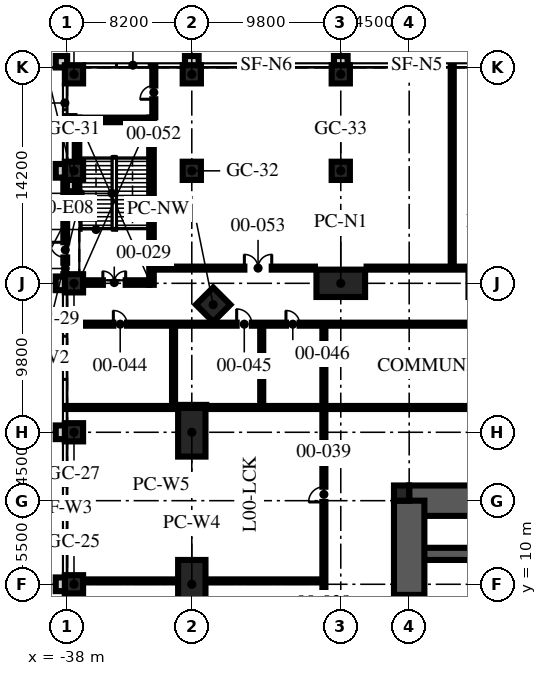
"""IFC4 building model, lengths in metres.
Left out: names, types, materials, properties, quantities, classifications, styles, units other than length and angle.
Written with IfcOpenShell. Run it as: python <this file> out.ifc"""

import sys

from ifc_helpers import new_model, si_unit, direction, frame, frame_2d, origin, origin_2d, place, context, subcontext, project, spatial, rectangle, hollow_rectangle, extrude, element, fill, save


model = new_model("IFC4")
c1 = context("Model", 3, precision=1e-05, world=origin(), true_north=direction((0.0, 1.0)))
c2 = subcontext(c1, "Body", "Model", "MODEL_VIEW")
j1 = project(units=[si_unit("LENGTHUNIT", "METRE"), si_unit("PLANEANGLEUNIT", "RADIAN")], contexts=[c1])
p1 = place(None, origin())
s1 = spatial("IfcSite", under=j1, at=p1, CompositionType="ELEMENT")
p2 = place(p1, origin())
s2 = spatial("IfcBuilding", under=s1, at=p2, CompositionType="ELEMENT")
p3 = place(p2, origin())
s3 = spatial("IfcBuildingStorey", under=s2, at=p3, CompositionType="ELEMENT", Elevation=0.0)
p4 = place(p3, frame((-15.5, 15.5, -0.3), z_axis=(0.0, 0.0, 1.0), x_axis=(1.0, 0.0, 0.0)))
e1 = element("IfcWall", 1, at=p4, inside=s3, PredefinedType="SHEAR", context=c2, shape_type="SweptSolid", body=[
    extrude(rectangle(XDim=31.0, YDim=2.0, at=frame_2d((15.5, 0.0))), origin(), (0.0, 0.0, 1.0), 6.0),
])
p5 = place(p4, frame((10.4, 0.0, 0.3)))
e2 = element("IfcOpeningElement", 2, at=p5, cuts=e1, PredefinedType="OPENING", context=c2, shape_type="SweptSolid", body=[
    extrude(rectangle(XDim=1.1, YDim=2.1, at=frame_2d((0.55, 1.05))), frame((0.0, 1.01, 0.0), z_axis=(0.0, -1.0, 0.0), x_axis=(1.0, 0.0, 0.0)), (0.0, 0.0, 1.0), 2.02),
])
p6 = place(p4, frame((13.5, 0.0, 0.3)))
e3 = element("IfcOpeningElement", 3, at=p6, cuts=e1, PredefinedType="OPENING", context=c2, shape_type="SweptSolid", body=[
    extrude(rectangle(XDim=1.1, YDim=2.1, at=frame_2d((0.55, 1.05))), frame((0.0, 1.01, 0.0), z_axis=(0.0, -1.0, 0.0), x_axis=(1.0, 0.0, 0.0)), (0.0, 0.0, 1.0), 2.02),
])
p7 = place(p4, frame((16.6, 0.0, 0.3)))
e4 = element("IfcOpeningElement", 4, at=p7, cuts=e1, PredefinedType="OPENING", context=c2, shape_type="SweptSolid", body=[
    extrude(rectangle(XDim=1.1, YDim=2.1, at=frame_2d((0.55, 1.05))), frame((0.0, 1.01, 0.0), z_axis=(0.0, -1.0, 0.0), x_axis=(1.0, 0.0, 0.0)), (0.0, 0.0, 1.0), 2.02),
])
p8 = place(p3, frame((-15.5, 12.0, -0.3), z_axis=(0.0, 0.0, 1.0), x_axis=(1.0, 0.0, 0.0)))
e5 = element("IfcWall", 5, at=p8, inside=s3, PredefinedType="SHEAR", context=c2, shape_type="SweptSolid", body=[
    extrude(rectangle(XDim=31.0, YDim=0.8, at=frame_2d((15.5, 0.0))), origin(), (0.0, 0.0, 1.0), 6.0),
])
p9 = place(p3, frame((-15.5, -15.5, -0.3), z_axis=(0.0, 0.0, 1.0), x_axis=(0.0, 1.0, 0.0)))
e6 = element("IfcWall", 6, at=p9, inside=s3, PredefinedType="SHEAR", context=c2, shape_type="SweptSolid", body=[
    extrude(rectangle(XDim=31.0, YDim=2.0, at=frame_2d((15.5, 0.0))), origin(), (0.0, 0.0, 1.0), 6.0),
])
p10 = place(p9, frame((6.5, 0.0, 0.3)))
e7 = element("IfcOpeningElement", 7, at=p10, cuts=e6, PredefinedType="OPENING", context=c2, shape_type="SweptSolid", body=[
    extrude(rectangle(XDim=1.2, YDim=2.1, at=frame_2d((0.6, 1.05))), frame((0.0, 1.01, 0.0), z_axis=(0.0, -1.0, 0.0), x_axis=(1.0, 0.0, 0.0)), (0.0, 0.0, 1.0), 2.02),
])
p11 = place(p9, frame((23.0, 0.0, 0.3)))
e8 = element("IfcOpeningElement", 8, at=p11, cuts=e6, PredefinedType="OPENING", context=c2, shape_type="SweptSolid", body=[
    extrude(rectangle(XDim=1.8, YDim=2.1, at=frame_2d((0.9, 1.05))), frame((0.0, 1.01, 0.0), z_axis=(0.0, -1.0, 0.0), x_axis=(1.0, 0.0, 0.0)), (0.0, 0.0, 1.0), 2.02),
])
p12 = place(p3, frame((-16.0, 16.0, -0.3), z_axis=(0.0, 0.0, 1.0), x_axis=(1.0, 0.0, 0.0)))
e9 = element("IfcColumn", 9, at=p12, inside=s3, PredefinedType="COLUMN", context=c2, shape_type="SweptSolid", body=[
    extrude(rectangle(XDim=1.0, YDim=1.0, at=origin_2d()), origin(), (0.0, 0.0, 1.0), 6.0),
])
for number, where, z_axis, x_axis in (
    (10, (-20.0, 29.8, 0.0), (0.0, 0.0, 1.0), (1.0, 0.0, 0.0)),
    (11, (-29.8, 10.0, 0.0), (0.0, 0.0, 1.0), (0.0, 1.0, 0.0)),
    (12, (-29.8, 20.0, 0.0), (0.0, 0.0, 1.0), (0.0, 1.0, 0.0)),
):
    element("IfcColumn", number, at=place(p3, frame(where, z_axis=z_axis, x_axis=x_axis)), inside=s3, PredefinedType="COLUMN", context=c2, shape_type="SweptSolid", body=[
        extrude(hollow_rectangle(XDim=3.2, YDim=1.8, WallThickness=0.2, at=origin_2d()), origin(), (0.0, 0.0, 1.0), 6.0),
    ])
p13 = place(p3, frame((-28.394, 28.394, 0.0), z_axis=(0.0, 0.0, 1.0), x_axis=(0.707106781187, 0.707106781187, 0.0)))
e13 = element("IfcColumn", 13, at=p13, inside=s3, PredefinedType="COLUMN", context=c2, shape_type="SweptSolid", body=[
    extrude(hollow_rectangle(XDim=1.6, YDim=1.6, WallThickness=0.1, at=origin_2d()), origin(), (0.0, 0.0, 1.0), 6.0),
])
for number, where, z_axis, x_axis in (
    (14, (-37.55, 10.0, 0.0), (0.0, 0.0, 1.0), (1.0, 0.0, 0.0)),
    (15, (-37.55, 20.0, 0.0), (0.0, 0.0, 1.0), (1.0, 0.0, 0.0)),
    (16, (-37.55, 29.8, 0.0), (0.0, 0.0, 1.0), (1.0, 0.0, 0.0)),
    (17, (-37.55, 37.2, 0.0), (0.0, 0.0, 1.0), (1.0, 0.0, 0.0)),
    (18, (-29.8, 37.2, 0.0), (0.0, 0.0, 1.0), (1.0, 0.0, 0.0)),
    (19, (-20.0, 37.2, 0.0), (0.0, 0.0, 1.0), (1.0, 0.0, 0.0)),
    (20, (-37.55, 43.55, 0.0), (0.0, 0.0, 1.0), (1.0, 0.0, 0.0)),
    (21, (-29.8, 43.55, 0.0), (0.0, 0.0, 1.0), (1.0, 0.0, 0.0)),
    (22, (-20.0, 43.55, 0.0), (0.0, 0.0, 1.0), (1.0, 0.0, 0.0)),
):
    element("IfcColumn", number, at=place(p3, frame(where, z_axis=z_axis, x_axis=x_axis)), inside=s3, PredefinedType="COLUMN", context=c2, shape_type="SweptSolid", body=[
        extrude(rectangle(XDim=1.2, YDim=1.2, at=origin_2d()), origin(), (0.0, 0.0, 1.0), 6.0),
    ])
for number, where, z_axis, x_axis in (
    (23, (-19.55, 44.375, -0.2), (0.0, 0.0, 1.0), (-1.0, 0.0, 0.0)),
    (24, (-29.35, 44.375, -0.2), (0.0, 0.0, 1.0), (-1.0, 0.0, 0.0)),
):
    element("IfcWall", number, at=place(p3, frame(where, z_axis=z_axis, x_axis=x_axis)), inside=s3, PredefinedType="SOLIDWALL", context=c2, shape_type="SweptSolid", body=[
        extrude(rectangle(XDim=0.9, YDim=0.75, at=frame_2d((0.45, 0.0))), origin(), (0.0, 0.0, 1.0), 6.2),
    ])
p14 = place(p3, frame((-38.0, 44.375, -0.2), z_axis=(0.0, 0.0, 1.0), x_axis=(-1.0, 0.0, 0.0)))
e25 = element("IfcWall", 25, at=p14, inside=s3, PredefinedType="SOLIDWALL", context=c2, shape_type="SweptSolid", body=[
    extrude(rectangle(XDim=0.75, YDim=0.75, at=frame_2d((0.375, 0.0))), origin(), (0.0, 0.0, 1.0), 6.2),
])
for number, where, z_axis, x_axis in (
    (26, (-38.375, 37.65, -0.2), (0.0, 0.0, 1.0), (0.0, -1.0, 0.0)),
    (27, (-38.375, 30.25, -0.2), (0.0, 0.0, 1.0), (0.0, -1.0, 0.0)),
    (28, (-38.375, 20.45, -0.2), (0.0, 0.0, 1.0), (0.0, -1.0, 0.0)),
    (29, (-38.375, 10.45, -0.2), (0.0, 0.0, 1.0), (0.0, -1.0, 0.0)),
):
    element("IfcWall", number, at=place(p3, frame(where, z_axis=z_axis, x_axis=x_axis)), inside=s3, PredefinedType="SOLIDWALL", context=c2, shape_type="SweptSolid", body=[
        extrude(rectangle(XDim=0.9, YDim=0.75, at=frame_2d((0.45, 0.0))), origin(), (0.0, 0.0, 1.0), 6.2),
    ])
p15 = place(p3, frame((-38.125, 36.75, -0.2), z_axis=(0.0, 0.0, 1.0), x_axis=(0.0, -1.0, 0.0)))
e30 = element("IfcWall", 30, at=p15, inside=s3, PredefinedType="SOLIDWALL", context=c2, shape_type="SweptSolid", body=[
    extrude(rectangle(XDim=6.5, YDim=0.25, at=frame_2d((3.25, 0.0))), origin(), (0.0, 0.0, 1.0), 5.6),
])
p16 = place(p15, frame((5.6, 0.0, 1.4)))
e31 = element("IfcOpeningElement", 31, at=p16, cuts=e30, PredefinedType="OPENING", context=c2, shape_type="SweptSolid", body=[
    extrude(rectangle(XDim=0.75, YDim=1.7, at=frame_2d((0.375, 0.85))), frame((0.0, 0.135, 0.0), z_axis=(0.0, -1.0, 0.0), x_axis=(1.0, 0.0, 0.0)), (0.0, 0.0, 1.0), 0.27),
])
p17 = place(p15, frame((5.25, 0.0, 0.2), z_axis=(0.0, 0.0, 1.0), x_axis=(-1.0, 0.0, 0.0)))
e32 = element("IfcOpeningElement", 32, at=p17, cuts=e30, PredefinedType="OPENING", context=c2, shape_type="SweptSolid", body=[
    extrude(rectangle(XDim=1.0, YDim=2.4, at=frame_2d((0.5, 1.2))), frame((0.0, 0.135, 0.0), z_axis=(0.0, -1.0, 0.0), x_axis=(1.0, 0.0, 0.0)), (0.0, 0.0, 1.0), 0.27),
])
p18 = place(p3, frame((-37.35, 35.556, 0.0), z_axis=(0.0, 0.0, 1.0), x_axis=(0.0, 1.0, 0.0)))
e33 = element("IfcWall", 33, at=p18, inside=s3, PredefinedType="SOLIDWALL", context=c2, shape_type="SweptSolid", body=[
    extrude(rectangle(XDim=5.144, YDim=0.3, at=frame_2d((2.572, 0.0))), origin(), (0.0, 0.0, 1.0), 5.7),
])
p19 = place(p3, frame((-38.0, 35.706, 0.0), z_axis=(0.0, 0.0, 1.0), x_axis=(1.0, 0.0, 0.0)))
e34 = element("IfcWall", 34, at=p19, inside=s3, PredefinedType="PARTITIONING", context=c2, shape_type="SweptSolid", body=[
    extrude(rectangle(XDim=0.5, YDim=0.3, at=frame_2d((0.25, 0.0))), origin(), (0.0, 0.0, 1.0), 4.27),
])
p20 = place(p3, frame((-38.0, 29.85, 0.0), z_axis=(0.0, 0.0, 1.0), x_axis=(1.0, 0.0, 0.0)))
e35 = element("IfcWall", 35, at=p20, inside=s3, PredefinedType="SOLIDWALL", context=c2, shape_type="SweptSolid", body=[
    extrude(rectangle(XDim=5.4, YDim=0.3, at=frame_2d((2.7, 0.0))), origin(), (0.0, 0.0, 1.0), 5.7),
])
p21 = place(p20, frame((2.35, 0.0, 0.0)))
e36 = element("IfcOpeningElement", 36, at=p21, cuts=e35, PredefinedType="OPENING", context=c2, shape_type="SweptSolid", body=[
    extrude(rectangle(XDim=1.5, YDim=2.1, at=frame_2d((0.75, 1.05))), frame((0.0, 0.16, 0.0), z_axis=(0.0, -1.0, 0.0), x_axis=(1.0, 0.0, 0.0)), (0.0, 0.0, 1.0), 0.32),
])
p22 = place(p3, frame((-32.45, 29.7, 0.0), z_axis=(0.0, 0.0, 1.0), x_axis=(0.0, 1.0, 0.0)))
e37 = element("IfcWall", 37, at=p22, inside=s3, PredefinedType="SOLIDWALL", context=c2, shape_type="SweptSolid", body=[
    extrude(rectangle(XDim=11.0, YDim=0.3, at=frame_2d((5.5, 0.0))), origin(), (0.0, 0.0, 1.0), 5.7),
])
p23 = place(p3, frame((-37.2, 40.55, 0.0), z_axis=(0.0, 0.0, 1.0), x_axis=(1.0, 0.0, 0.0)))
e38 = element("IfcWall", 38, at=p23, inside=s3, PredefinedType="SOLIDWALL", context=c2, shape_type="SweptSolid", body=[
    extrude(rectangle(XDim=4.6, YDim=0.3, at=frame_2d((2.3, 0.0))), origin(), (0.0, 0.0, 1.0), 5.7),
])
p24 = place(p3, frame((-21.111, -20.491, 0.0), z_axis=(0.0, 0.0, 1.0), x_axis=(0.0, 1.0, 0.0)))
e39 = element("IfcWall", 39, at=p24, inside=s3, PredefinedType="SOLIDWALL", context=c2, shape_type="SweptSolid", body=[
    extrude(rectangle(XDim=42.022, YDim=0.2, at=frame_2d((21.011, 0.0))), origin(), (0.0, 0.0, 1.0), 4.5),
])
p25 = place(p24, frame((6.352, 0.0, 0.0)))
e40 = element("IfcOpeningElement", 40, at=p25, cuts=e39, PredefinedType="OPENING", context=c2, shape_type="SweptSolid", body=[
    extrude(rectangle(XDim=1.0, YDim=2.1, at=frame_2d((0.5, 1.05))), frame((0.0, 0.11, 0.0), z_axis=(0.0, -1.0, 0.0), x_axis=(1.0, 0.0, 0.0)), (0.0, 0.0, 1.0), 0.22),
])
p26 = place(p24, frame((17.537, 0.0, 0.0)))
e41 = element("IfcOpeningElement", 41, at=p26, cuts=e39, PredefinedType="OPENING", context=c2, shape_type="SweptSolid", body=[
    extrude(rectangle(XDim=1.0, YDim=2.1, at=frame_2d((0.5, 1.05))), frame((0.0, 0.11, 0.0), z_axis=(0.0, -1.0, 0.0), x_axis=(1.0, 0.0, 0.0)), (0.0, 0.0, 1.0), 0.22),
])
p27 = place(p24, frame((25.981, 0.0, 0.0)))
e42 = element("IfcOpeningElement", 42, at=p27, cuts=e39, PredefinedType="OPENING", context=c2, shape_type="SweptSolid", body=[
    extrude(rectangle(XDim=1.0, YDim=2.1, at=frame_2d((0.5, 1.05))), frame((0.0, 0.11, 0.0), z_axis=(0.0, -1.0, 0.0), x_axis=(1.0, 0.0, 0.0)), (0.0, 0.0, 1.0), 0.22),
])
p28 = place(p24, frame((35.907, 0.0, 0.0)))
e43 = element("IfcOpeningElement", 43, at=p28, cuts=e39, PredefinedType="OPENING", context=c2, shape_type="SweptSolid", body=[
    extrude(rectangle(XDim=1.0, YDim=2.1, at=frame_2d((0.5, 1.05))), frame((0.0, 0.11, 0.0), z_axis=(0.0, -1.0, 0.0), x_axis=(1.0, 0.0, 0.0)), (0.0, 0.0, 1.0), 0.22),
])
p29 = place(p3, frame((-36.92, 10.222, 0.0), z_axis=(0.0, 0.0, 1.0), x_axis=(1.0, 0.0, 0.0)))
e44 = element("IfcWall", 44, at=p29, inside=s3, PredefinedType="SOLIDWALL", context=c2, shape_type="SweptSolid", body=[
    extrude(rectangle(XDim=6.19, YDim=0.2, at=frame_2d((3.095, 0.0))), origin(), (0.0, 0.0, 1.0), 4.7),
])
p30 = place(p3, frame((-28.87, 10.222, 0.0), z_axis=(0.0, 0.0, 1.0), x_axis=(1.0, 0.0, 0.0)))
e45 = element("IfcWall", 45, at=p30, inside=s3, PredefinedType="SOLIDWALL", context=c2, shape_type="SweptSolid", body=[
    extrude(rectangle(XDim=7.659, YDim=0.2, at=frame_2d((3.83, 0.0))), origin(), (0.0, 0.0, 1.0), 4.5),
])
p31 = place(p3, frame((-38.075, 21.631, 0.0), z_axis=(0.0, 0.0, 1.0), x_axis=(1.0, 0.0, 0.0)))
e46 = element("IfcWall", 46, at=p31, inside=s3, PredefinedType="SOLIDWALL", context=c2, shape_type="SweptSolid", body=[
    extrude(rectangle(XDim=7.325, YDim=0.2, at=frame_2d((3.663, 0.0))), origin(), (0.0, 0.0, 1.0), 4.7),
])
p32 = place(p3, frame((-28.85, 21.631, 0.0), z_axis=(0.0, 0.0, 1.0), x_axis=(1.0, 0.0, 0.0)))
e47 = element("IfcWall", 47, at=p32, inside=s3, PredefinedType="SOLIDWALL", context=c2, shape_type="SweptSolid", body=[
    extrude(rectangle(XDim=26.95, YDim=0.2, at=frame_2d((13.475, 0.0))), origin(), (0.0, 0.0, 1.0), 4.5),
])
p33 = place(p3, frame((-30.75, 21.702, 0.0), z_axis=(0.0, 0.0, 1.0), x_axis=(1.0, 0.0, 0.0)))
e48 = element("IfcWall", 48, at=p33, inside=s3, PredefinedType="SOLIDWALL", context=c2, shape_type="SweptSolid", body=[
    extrude(rectangle(XDim=1.9, YDim=0.2, at=frame_2d((0.95, 0.0))), origin(), (0.0, 0.0, 1.0), 4.7),
])
p34 = place(p3, frame((-31.0, 21.731, 0.0), z_axis=(0.0, 0.0, 1.0), x_axis=(0.0, 1.0, 0.0)))
e49 = element("IfcWall", 49, at=p34, inside=s3, PredefinedType="SOLIDWALL", context=c2, shape_type="SweptSolid", body=[
    extrude(rectangle(XDim=5.28, YDim=0.2, at=frame_2d((2.64, 0.0))), origin(), (0.0, 0.0, 1.0), 5.7),
])
p35 = place(p3, frame((-25.2, 21.731, 0.0), z_axis=(0.0, 0.0, 1.0), x_axis=(0.0, 1.0, 0.0)))
e50 = element("IfcWall", 50, at=p35, inside=s3, PredefinedType="SOLIDWALL", context=c2, shape_type="SweptSolid", body=[
    extrude(rectangle(XDim=5.28, YDim=0.2, at=frame_2d((2.64, 0.0))), origin(), (0.0, 0.0, 1.0), 4.5),
])
p36 = place(p3, frame((-21.111, 21.731, 0.0), z_axis=(0.0, 0.0, 1.0), x_axis=(0.0, 1.0, 0.0)))
e51 = element("IfcWall", 51, at=p36, inside=s3, PredefinedType="SOLIDWALL", context=c2, shape_type="SweptSolid", body=[
    extrude(rectangle(XDim=5.28, YDim=0.2, at=frame_2d((2.64, 0.0))), origin(), (0.0, 0.0, 1.0), 5.7),
])
p37 = place(p3, frame((-38.075, 27.111, 0.0), z_axis=(0.0, 0.0, 1.0), x_axis=(1.0, 0.0, 0.0)))
e52 = element("IfcWall", 52, at=p37, inside=s3, PredefinedType="SOLIDWALL", context=c2, shape_type="SweptSolid", body=[
    extrude(rectangle(XDim=36.175, YDim=0.2, at=frame_2d((18.087, 0.0))), origin(), (0.0, 0.0, 1.0), 4.5),
])
p38 = place(p37, frame((3.115, 0.0, 0.0)))
e53 = element("IfcOpeningElement", 53, at=p38, cuts=e52, PredefinedType="OPENING", context=c2, shape_type="SweptSolid", body=[
    extrude(rectangle(XDim=0.9, YDim=2.1, at=frame_2d((0.45, 1.05))), frame((0.0, 0.11, 0.0), z_axis=(0.0, -1.0, 0.0), x_axis=(1.0, 0.0, 0.0)), (0.0, 0.0, 1.0), 0.22),
])
p39 = place(p37, frame((11.227, 0.0, 0.0)))
e54 = element("IfcOpeningElement", 54, at=p39, cuts=e52, PredefinedType="OPENING", context=c2, shape_type="SweptSolid", body=[
    extrude(rectangle(XDim=1.0, YDim=2.1, at=frame_2d((0.5, 1.05))), frame((0.0, 0.11, 0.0), z_axis=(0.0, -1.0, 0.0), x_axis=(1.0, 0.0, 0.0)), (0.0, 0.0, 1.0), 0.22),
])
p40 = place(p37, frame((14.469, 0.0, 0.0)))
e55 = element("IfcOpeningElement", 55, at=p40, cuts=e52, PredefinedType="OPENING", context=c2, shape_type="SweptSolid", body=[
    extrude(rectangle(XDim=0.9, YDim=2.1, at=frame_2d((0.45, 1.05))), frame((0.0, 0.11, 0.0), z_axis=(0.0, -1.0, 0.0), x_axis=(1.0, 0.0, 0.0)), (0.0, 0.0, 1.0), 0.22),
])
p41 = place(p3, frame((-32.28, 30.8, 0.0), z_axis=(0.0, 0.0, 1.0), x_axis=(1.0, 0.0, 0.0)))
e56 = element("IfcWall", 56, at=p41, inside=s3, PredefinedType="SOLIDWALL", context=c2, shape_type="SweptSolid", body=[
    extrude(rectangle(XDim=10.58, YDim=0.2, at=frame_2d((5.29, 0.0))), origin(), (0.0, 0.0, 1.0), 5.7),
])
p42 = place(p41, frame((5.938, 0.0, 0.0)))
e57 = element("IfcOpeningElement", 57, at=p42, cuts=e56, PredefinedType="OPENING", context=c2, shape_type="SweptSolid", body=[
    extrude(rectangle(XDim=1.8, YDim=2.4, at=frame_2d((0.9, 1.2))), frame((0.0, 0.11, 0.0), z_axis=(0.0, -1.0, 0.0), x_axis=(1.0, 0.0, 0.0)), (0.0, 0.0, 1.0), 0.22),
])
p43 = place(p3, frame((-18.3, 30.8, 0.0), z_axis=(0.0, 0.0, 1.0), x_axis=(1.0, 0.0, 0.0)))
e58 = element("IfcWall", 58, at=p43, inside=s3, PredefinedType="SOLIDWALL", context=c2, shape_type="SweptSolid", body=[
    extrude(rectangle(XDim=6.6, YDim=0.2, at=frame_2d((3.3, 0.0))), origin(), (0.0, 0.0, 1.0), 5.7),
])
p44 = place(p3, frame((-12.667, 30.9, 0.0), z_axis=(0.0, 0.0, 1.0), x_axis=(0.0, 1.0, 0.0)))
e59 = element("IfcWall", 59, at=p44, inside=s3, PredefinedType="SOLIDWALL", context=c2, shape_type="SweptSolid", body=[
    extrude(rectangle(XDim=13.175, YDim=0.2, at=frame_2d((6.587, 0.0))), origin(), (0.0, 0.0, 1.0), 4.7),
])
p45 = place(p3, frame((-38.075, 40.7, 0.0), z_axis=(0.0, 0.0, 1.0), x_axis=(1.0, 0.0, 0.0)))
e60 = element("IfcWall", 60, at=p45, inside=s3, PredefinedType="SOLIDWALL", context=c2, shape_type="SweptSolid", body=[
    extrude(rectangle(XDim=0.555, YDim=0.2, at=frame_2d((0.277, 0.0))), origin(), (0.0, 0.0, 1.0), 4.27),
])
p46 = place(p3, frame((-32.3, 40.72, 0.0), z_axis=(0.0, 0.0, 1.0), x_axis=(0.0, 1.0, 0.0)))
e61 = element("IfcWall", 61, at=p46, inside=s3, PredefinedType="SOLIDWALL", context=c2, shape_type="SweptSolid", body=[
    extrude(rectangle(XDim=3.355, YDim=0.2, at=frame_2d((1.677, 0.0))), origin(), (0.0, 0.0, 1.0), 4.7),
])
p47 = place(p46, frame((1.19, 0.0, 0.0)))
e62 = element("IfcOpeningElement", 62, at=p47, cuts=e61, PredefinedType="OPENING", context=c2, shape_type="SweptSolid", body=[
    extrude(rectangle(XDim=0.9, YDim=2.1, at=frame_2d((0.45, 1.05))), frame((0.0, 0.11, 0.0), z_axis=(0.0, -1.0, 0.0), x_axis=(1.0, 0.0, 0.0)), (0.0, 0.0, 1.0), 0.22),
])
p48 = place(p16, origin())
e63 = element("IfcWindow", 63, at=p48, inside=s3, PartitioningType="SINGLE_PANEL", PredefinedType="WINDOW", context=c2, shape_type="SweptSolid", body=[
    extrude(rectangle(XDim=0.75, YDim=1.7, at=frame_2d((0.375, 0.85))), frame((0.0, 0.03, 0.0), z_axis=(0.0, -1.0, 0.0), x_axis=(1.0, 0.0, 0.0)), (0.0, 0.0, 1.0), 0.06),
])
fill(e31, e63)
p49 = place(p17, origin())
e64 = element("IfcDoor", 64, at=p49, inside=s3, OperationType="SINGLE_SWING_LEFT", PredefinedType="DOOR", context=c2, shape_type="SweptSolid", body=[
    extrude(rectangle(XDim=1.0, YDim=2.4, at=frame_2d((0.5, 1.2))), frame((0.0, 0.025, 0.0), z_axis=(0.0, -1.0, 0.0), x_axis=(1.0, 0.0, 0.0)), (0.0, 0.0, 1.0), 0.05),
])
fill(e32, e64)
p50 = place(p11, origin())
e65 = element("IfcDoor", 65, at=p50, inside=s3, OperationType="DOUBLE_DOOR_SINGLE_SWING", PredefinedType="DOOR", context=c2, shape_type="SweptSolid", body=[
    extrude(rectangle(XDim=1.8, YDim=2.1, at=frame_2d((0.9, 1.05))), frame((0.0, 0.025, 0.0), z_axis=(0.0, -1.0, 0.0), x_axis=(1.0, 0.0, 0.0)), (0.0, 0.0, 1.0), 0.05),
])
fill(e8, e65)
p51 = place(p21, origin())
e66 = element("IfcDoor", 66, at=p51, inside=s3, OperationType="DOUBLE_DOOR_SINGLE_SWING", PredefinedType="DOOR", context=c2, shape_type="SweptSolid", body=[
    extrude(rectangle(XDim=1.5, YDim=2.1, at=frame_2d((0.75, 1.05))), frame((0.0, 0.025, 0.0), z_axis=(0.0, -1.0, 0.0), x_axis=(1.0, 0.0, 0.0)), (0.0, 0.0, 1.0), 0.05),
])
fill(e36, e66)
p52 = place(p28, origin())
e67 = element("IfcDoor", 67, at=p52, inside=s3, OperationType="SINGLE_SWING_LEFT", PredefinedType="DOOR", context=c2, shape_type="SweptSolid", body=[
    extrude(rectangle(XDim=1.0, YDim=2.1, at=frame_2d((0.5, 1.05))), frame((0.0, 0.025, 0.0), z_axis=(0.0, -1.0, 0.0), x_axis=(1.0, 0.0, 0.0)), (0.0, 0.0, 1.0), 0.05),
])
fill(e43, e67)
p53 = place(p38, origin())
e68 = element("IfcDoor", 68, at=p53, inside=s3, OperationType="SINGLE_SWING_LEFT", PredefinedType="DOOR", context=c2, shape_type="SweptSolid", body=[
    extrude(rectangle(XDim=0.9, YDim=2.1, at=frame_2d((0.45, 1.05))), frame((0.0, 0.025, 0.0), z_axis=(0.0, -1.0, 0.0), x_axis=(1.0, 0.0, 0.0)), (0.0, 0.0, 1.0), 0.05),
])
fill(e53, e68)
p54 = place(p39, origin())
e69 = element("IfcDoor", 69, at=p54, inside=s3, OperationType="SINGLE_SWING_LEFT", PredefinedType="DOOR", context=c2, shape_type="SweptSolid", body=[
    extrude(rectangle(XDim=1.0, YDim=2.1, at=frame_2d((0.5, 1.05))), frame((0.0, 0.025, 0.0), z_axis=(0.0, -1.0, 0.0), x_axis=(1.0, 0.0, 0.0)), (0.0, 0.0, 1.0), 0.05),
])
fill(e54, e69)
p55 = place(p40, origin())
e70 = element("IfcDoor", 70, at=p55, inside=s3, OperationType="SINGLE_SWING_LEFT", PredefinedType="DOOR", context=c2, shape_type="SweptSolid", body=[
    extrude(rectangle(XDim=0.9, YDim=2.1, at=frame_2d((0.45, 1.05))), frame((0.0, 0.025, 0.0), z_axis=(0.0, -1.0, 0.0), x_axis=(1.0, 0.0, 0.0)), (0.0, 0.0, 1.0), 0.05),
])
fill(e55, e70)
p56 = place(p47, origin())
e71 = element("IfcDoor", 71, at=p56, inside=s3, OperationType="SINGLE_SWING_LEFT", PredefinedType="DOOR", context=c2, shape_type="SweptSolid", body=[
    extrude(rectangle(XDim=0.9, YDim=2.1, at=frame_2d((0.45, 1.05))), frame((0.0, 0.025, 0.0), z_axis=(0.0, -1.0, 0.0), x_axis=(1.0, 0.0, 0.0)), (0.0, 0.0, 1.0), 0.05),
])
fill(e62, e71)
p57 = place(p42, origin())
e72 = element("IfcDoor", 72, at=p57, inside=s3, OperationType="DOUBLE_DOOR_SINGLE_SWING", PredefinedType="DOOR", context=c2, shape_type="SweptSolid", body=[
    extrude(rectangle(XDim=1.8, YDim=2.4, at=frame_2d((0.9, 1.2))), frame((0.0, 0.025, 0.0), z_axis=(0.0, -1.0, 0.0), x_axis=(1.0, 0.0, 0.0)), (0.0, 0.0, 1.0), 0.05),
])
fill(e57, e72)
save(model, sys.argv[1])
